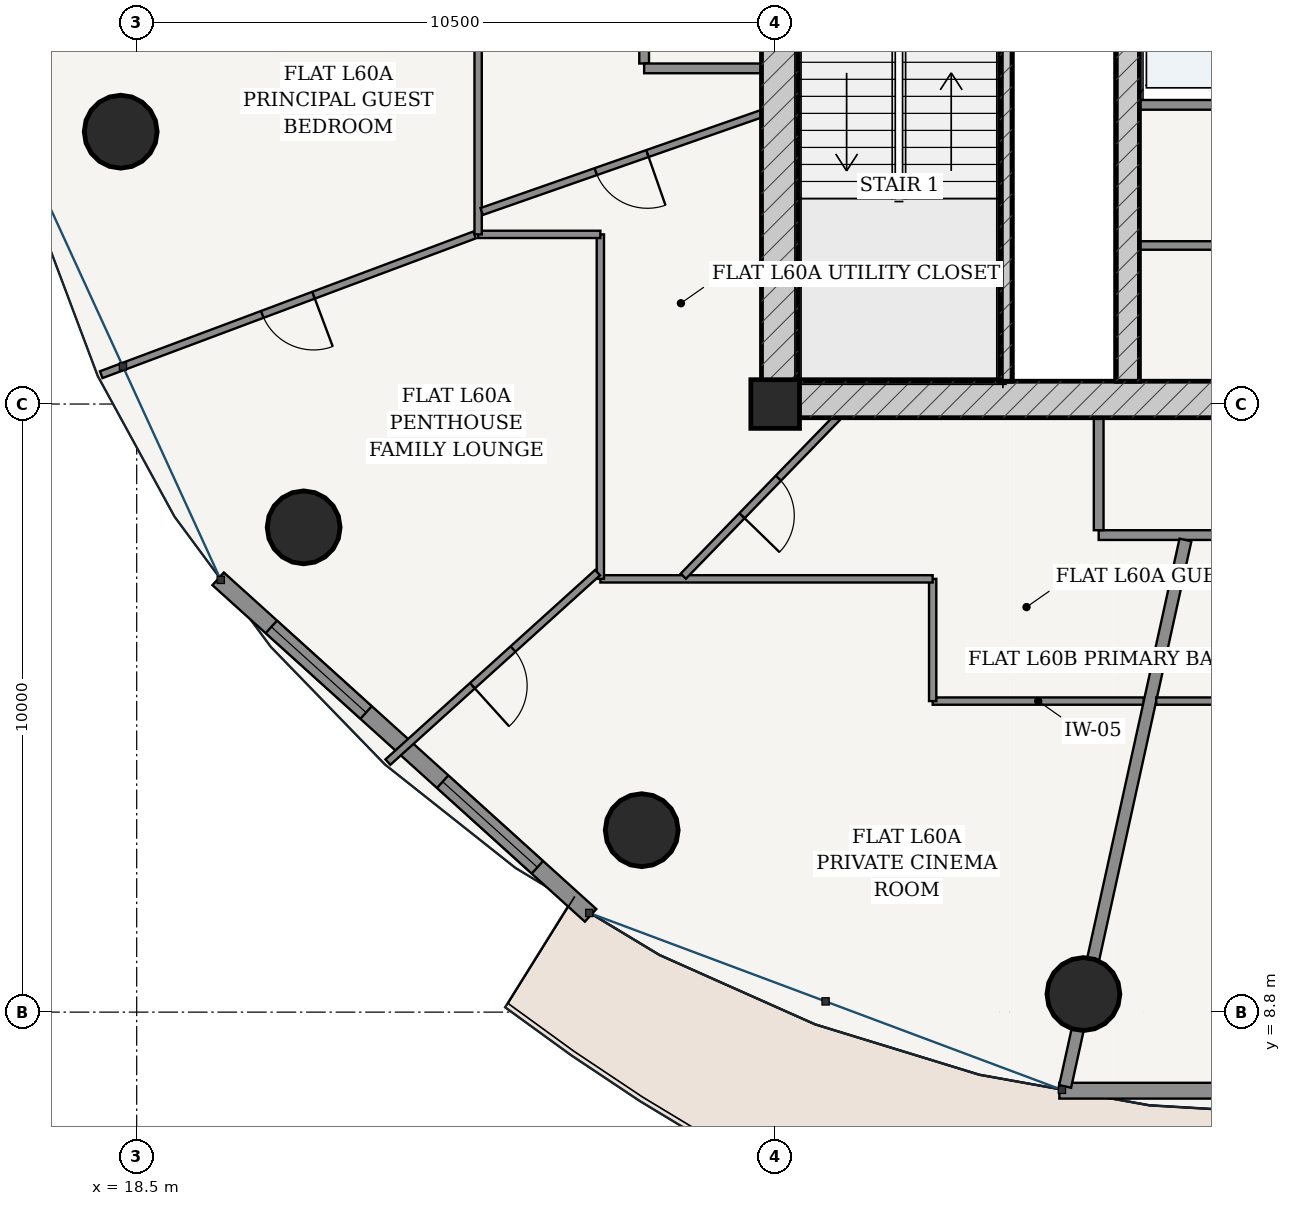
"""IFC4 building model, lengths in metres.
Left out: names, types, materials, properties, quantities, classifications, styles, units other than length and angle.
Written with IfcOpenShell. Run it as: python <this file> out.ifc"""

import sys

from ifc_helpers import new_model, si_unit, direction, frame, frame_2d, origin, origin_2d, place, context, subcontext, project, spatial, rectangle, hollow_circle, extrude, source, transform, mapped, element, fill, save


model = new_model("IFC4")
c1 = context("Model", 3, precision=1e-05, world=origin(), true_north=direction((-0.2419218956, 0.970295726276)))
c2 = subcontext(c1, "Body", "Model", "MODEL_VIEW")
j1 = project(units=[si_unit("LENGTHUNIT", "METRE"), si_unit("PLANEANGLEUNIT", "RADIAN")], contexts=[c1])
p1 = place(None, origin())
s1 = spatial("IfcSite", under=j1, at=p1, CompositionType="ELEMENT")
p2 = place(p1, origin())
s2 = spatial("IfcBuilding", under=s1, at=p2, CompositionType="ELEMENT")
p3 = place(p2, frame((0.0, 0.0, 228.2)))
s3 = spatial("IfcBuildingStorey", under=s2, at=p3, CompositionType="ELEMENT", Elevation=228.2)
p4 = place(p3, frame((29.0, 18.8, 0.0), z_axis=(0.0, 0.0, 1.0), x_axis=(1.0, 0.0, 0.0)))
e1 = element("IfcColumn", 1, at=p4, inside=s3, PredefinedType="COLUMN", context=c2, shape_type="SweptSolid", body=[
    extrude(rectangle(XDim=0.8, YDim=0.8, at=origin_2d()), origin(), (0.0, 0.0, 1.0), 3.7),
])
p5 = place(p3, frame((28.775, 18.875, 0.0), z_axis=(0.0, 0.0, 1.0), x_axis=(1.0, 0.0, 0.0)))
e2 = element("IfcWall", 2, at=p5, inside=s3, PredefinedType="SHEAR", context=c2, shape_type="SweptSolid", body=[
    extrude(rectangle(XDim=18.45, YDim=0.6, at=frame_2d((9.225, 0.0))), origin(), (0.0, 0.0, 1.0), 3.435),
])
p6 = place(p5, frame((8.8, 0.0, 0.0)))
e3 = element("IfcOpeningElement", 3, at=p6, cuts=e2, PredefinedType="OPENING", context=c2, shape_type="SweptSolid", body=[
    extrude(rectangle(XDim=0.85, YDim=2.1, at=frame_2d((0.425, 1.05))), frame((0.0, 0.31, 0.0), z_axis=(0.0, -1.0, 0.0), x_axis=(1.0, 0.0, 0.0)), (0.0, 0.0, 1.0), 0.62),
])
p7 = place(p3, frame((29.075, 19.175, 0.0), z_axis=(0.0, 0.0, 1.0), x_axis=(0.0, 1.0, 0.0)))
e4 = element("IfcWall", 4, at=p7, inside=s3, PredefinedType="SHEAR", context=c2, shape_type="SweptSolid", body=[
    extrude(rectangle(XDim=15.25, YDim=0.6, at=frame_2d((7.625, 0.0))), origin(), (0.0, 0.0, 1.0), 3.435),
])
p8 = place(p7, frame((9.875, 0.0, 0.0)))
e5 = element("IfcOpeningElement", 5, at=p8, cuts=e4, PredefinedType="OPENING", context=c2, shape_type="SweptSolid", body=[
    extrude(rectangle(XDim=1.5, YDim=2.2, at=frame_2d((0.75, 1.1))), frame((0.0, 0.31, 0.0), z_axis=(0.0, -1.0, 0.0), x_axis=(1.0, 0.0, 0.0)), (0.0, 0.0, 1.0), 0.62),
])
p9 = place(p3, frame((32.795, 19.175, 0.0), z_axis=(0.0, 0.0, 1.0), x_axis=(0.0, 1.0, 0.0)))
e6 = element("IfcWall", 6, at=p9, inside=s3, PredefinedType="SOLIDWALL", context=c2, shape_type="SweptSolid", body=[
    extrude(rectangle(XDim=7.375, YDim=0.2, at=frame_2d((3.688, 0.0))), origin(), (0.0, 0.0, 1.0), 3.435),
])
p10 = place(p3, frame((34.8, 19.175, 0.0), z_axis=(0.0, 0.0, 1.0), x_axis=(0.0, 1.0, 0.0)))
e7 = element("IfcWall", 7, at=p10, inside=s3, PredefinedType="SHEAR", context=c2, shape_type="SweptSolid", body=[
    extrude(rectangle(XDim=15.25, YDim=0.38, at=frame_2d((7.625, 0.0))), origin(), (0.0, 0.0, 1.0), 3.435),
])
p11 = place(p10, frame((7.8, 0.0, 0.0)))
e8 = element("IfcOpeningElement", 8, at=p11, cuts=e7, PredefinedType="OPENING", context=c2, shape_type="SweptSolid", body=[
    extrude(rectangle(XDim=1.05, YDim=2.15, at=frame_2d((0.525, 1.075))), frame((0.0, 0.2, 0.0), z_axis=(0.0, -1.0, 0.0), x_axis=(1.0, 0.0, 0.0)), (0.0, 0.0, 1.0), 0.4),
])
for number, where, z_axis, x_axis in (
    (9, (18.237, 23.279, 0.0), (0.0, 0.0, 1.0), (1.0, 0.0, 0.0)),
    (10, (21.246, 16.772, 0.0), (0.0, 0.0, 1.0), (1.0, 0.0, 0.0)),
    (11, (26.805, 11.792, 0.0), (0.0, 0.0, 1.0), (1.0, 0.0, 0.0)),
    (12, (34.069, 9.097, 0.0), (0.0, 0.0, 1.0), (1.0, 0.0, 0.0)),
):
    element("IfcColumn", number, at=place(p3, frame(where, z_axis=z_axis, x_axis=x_axis)), inside=s3, PredefinedType="COLUMN", context=c2, shape_type="SweptSolid", body=[
        extrude(hollow_circle(Radius=0.6, WallThickness=0.038, at=origin_2d()), origin(), (0.0, 0.0, 1.0), 3.7),
    ])
p12 = place(p3, frame((19.84, 15.926, 0.0), z_axis=(0.0, 0.0, 1.0), x_axis=(0.741986838603, -0.670414447443, 0.0)))
e13 = element("IfcWall", 13, at=p12, inside=s3, PredefinedType="SOLIDWALL", context=c2, shape_type="SweptSolid", body=[
    extrude(rectangle(XDim=8.255, YDim=0.28, at=frame_2d((4.127, 0.0))), origin(), (0.0, 0.0, 1.0), 3.435),
])
p13 = place(p12, frame((1.179, 0.0, 0.85)))
e14 = element("IfcOpeningElement", 14, at=p13, cuts=e13, PredefinedType="OPENING", context=c2, shape_type="SweptSolid", body=[
    extrude(rectangle(XDim=2.1, YDim=1.95, at=frame_2d((1.05, 0.975))), frame((0.0, 0.15, 0.0), z_axis=(0.0, -1.0, 0.0), x_axis=(1.0, 0.0, 0.0)), (0.0, 0.0, 1.0), 0.3),
])
p14 = place(p12, frame((4.976, 0.0, 0.85)))
e15 = element("IfcOpeningElement", 15, at=p14, cuts=e13, PredefinedType="OPENING", context=c2, shape_type="SweptSolid", body=[
    extrude(rectangle(XDim=2.1, YDim=1.95, at=frame_2d((1.05, 0.975))), frame((0.0, 0.15, 0.0), z_axis=(0.0, -1.0, 0.0), x_axis=(1.0, 0.0, 0.0)), (0.0, 0.0, 1.0), 0.3),
])
p15 = place(p3, frame((33.673, 7.508, 0.0), z_axis=(0.0, 0.0, 1.0), x_axis=(1.0, 0.0, 0.0)))
e16 = element("IfcWall", 16, at=p15, inside=s3, PredefinedType="SOLIDWALL", context=c2, shape_type="SweptSolid", body=[
    extrude(rectangle(XDim=8.654, YDim=0.26, at=frame_2d((4.327, 0.0))), origin(), (0.0, 0.0, 1.0), 3.435),
])
p16 = place(p15, frame((3.652, 0.0, 0.0)))
e17 = element("IfcOpeningElement", 17, at=p16, cuts=e16, PredefinedType="OPENING", context=c2, shape_type="SweptSolid", body=[
    extrude(rectangle(XDim=1.35, YDim=2.2, at=frame_2d((0.675, 1.1))), frame((0.0, 0.14, 0.0), z_axis=(0.0, -1.0, 0.0), x_axis=(1.0, 0.0, 0.0)), (0.0, 0.0, 1.0), 0.28),
])
p17 = place(p3, frame((34.99, 23.72, 0.0), z_axis=(0.0, 0.0, 1.0), x_axis=(1.0, 0.0, 0.0)))
e18 = element("IfcWall", 18, at=p17, inside=s3, PredefinedType="PARTITIONING", context=c2, shape_type="SweptSolid", body=[
    extrude(rectangle(XDim=6.02, YDim=0.16, at=frame_2d((3.01, 0.0))), origin(), (0.0, 0.0, 1.0), 3.435),
])
p18 = place(p3, frame((34.99, 21.407, 0.0), z_axis=(0.0, 0.0, 1.0), x_axis=(1.0, 0.0, 0.0)))
e19 = element("IfcWall", 19, at=p18, inside=s3, PredefinedType="PARTITIONING", context=c2, shape_type="SweptSolid", body=[
    extrude(rectangle(XDim=6.02, YDim=0.14, at=frame_2d((3.01, 0.0))), origin(), (0.0, 0.0, 1.0), 3.435),
])
p19 = place(p18, frame((2.585, 0.0, 0.0)))
e20 = element("IfcOpeningElement", 20, at=p19, cuts=e19, PredefinedType="OPENING", context=c2, shape_type="SweptSolid", body=[
    extrude(rectangle(XDim=0.85, YDim=2.1, at=frame_2d((0.425, 1.05))), frame((0.0, 0.08, 0.0), z_axis=(0.0, -1.0, 0.0), x_axis=(1.0, 0.0, 0.0)), (0.0, 0.0, 1.0), 0.16),
])
p20 = place(p3, frame((26.845, 24.4, 0.0), z_axis=(0.0, 0.0, 1.0), x_axis=(0.0, 1.0, 0.0)))
e21 = element("IfcWall", 21, at=p20, inside=s3, PredefinedType="PARTITIONING", context=c2, shape_type="SweptSolid", body=[
    extrude(rectangle(XDim=10.625, YDim=0.16, at=frame_2d((5.312, 0.0))), origin(), (0.0, 0.0, 1.0), 2.951),
])
p21 = place(p3, frame((26.845, 24.32, 0.0), z_axis=(0.0, 0.0, 1.0), x_axis=(1.0, 0.0, 0.0)))
e22 = element("IfcWall", 22, at=p21, inside=s3, PredefinedType="PARTITIONING", context=c2, shape_type="SweptSolid", body=[
    extrude(rectangle(XDim=1.93, YDim=0.16, at=frame_2d((0.965, 0.0))), origin(), (0.0, 0.0, 1.0), 3.435),
])
p22 = place(p3, frame((34.32, 16.645, 0.0), z_axis=(0.0, 0.0, 1.0), x_axis=(1.0, 0.0, 0.0)))
e23 = element("IfcWall", 23, at=p22, inside=s3, PredefinedType="PARTITIONING", context=c2, shape_type="SweptSolid", body=[
    extrude(rectangle(XDim=14.835, YDim=0.16, at=frame_2d((7.417, 0.0))), origin(), (0.0, 0.0, 1.0), 2.951),
])
p23 = place(p22, frame((10.135, 0.0, 0.0)))
e24 = element("IfcOpeningElement", 24, at=p23, cuts=e23, PredefinedType="OPENING", context=c2, shape_type="SweptSolid", body=[
    extrude(rectangle(XDim=0.98, YDim=2.2, at=frame_2d((0.49, 1.1))), frame((0.0, 0.09, 0.0), z_axis=(0.0, -1.0, 0.0), x_axis=(1.0, 0.0, 0.0)), (0.0, 0.0, 1.0), 0.18),
])
p24 = place(p3, frame((34.32, 16.725, 0.0), z_axis=(0.0, 0.0, 1.0), x_axis=(0.0, 1.0, 0.0)))
e25 = element("IfcWall", 25, at=p24, inside=s3, PredefinedType="PARTITIONING", context=c2, shape_type="SweptSolid", body=[
    extrude(rectangle(XDim=1.85, YDim=0.16, at=frame_2d((0.925, 0.0))), origin(), (0.0, 0.0, 1.0), 3.435),
])
p25 = place(p3, frame((35.062, 13.915, 0.0), z_axis=(0.0, 0.0, 1.0), x_axis=(-1.0, 0.0, 0.0)))
e26 = element("IfcWall", 26, at=p25, inside=s3, PredefinedType="PARTITIONING", context=c2, shape_type="SweptSolid", body=[
    extrude(rectangle(XDim=3.472, YDim=0.12, at=frame_2d((1.736, 0.0))), origin(), (0.0, 0.0, 1.0), 2.951),
])
p26 = place(p3, frame((31.59, 13.915, 0.0), z_axis=(0.0, 0.0, 1.0), x_axis=(0.0, 1.0, 0.0)))
e27 = element("IfcWall", 27, at=p26, inside=s3, PredefinedType="PARTITIONING", context=c2, shape_type="SweptSolid", body=[
    extrude(rectangle(XDim=2.01, YDim=0.12, at=frame_2d((1.005, 0.0))), origin(), (0.0, 0.0, 1.0), 3.11),
])
p27 = place(p3, frame((31.59, 15.925, 0.0), z_axis=(0.0, 0.0, 1.0), x_axis=(-1.0, 0.0, 0.0)))
e28 = element("IfcWall", 28, at=p27, inside=s3, PredefinedType="PARTITIONING", context=c2, shape_type="SweptSolid", body=[
    extrude(rectangle(XDim=5.465, YDim=0.12, at=frame_2d((2.732, 0.0))), origin(), (0.0, 0.0, 1.0), 2.951),
])
p28 = place(p3, frame((26.125, 15.925, 0.0), z_axis=(0.0, 0.0, 1.0), x_axis=(0.0, 1.0, 0.0)))
e29 = element("IfcWall", 29, at=p28, inside=s3, PredefinedType="PARTITIONING", context=c2, shape_type="SweptSolid", body=[
    extrude(rectangle(XDim=5.665, YDim=0.12, at=frame_2d((2.833, 0.0))), origin(), (0.0, 0.0, 1.0), 2.951),
])
p29 = place(p3, frame((26.125, 21.59, 0.0), z_axis=(0.0, 0.0, 1.0), x_axis=(-1.0, 0.0, 0.0)))
e30 = element("IfcWall", 30, at=p29, inside=s3, PredefinedType="PARTITIONING", context=c2, shape_type="SweptSolid", body=[
    extrude(rectangle(XDim=2.01, YDim=0.12, at=frame_2d((1.005, 0.0))), origin(), (0.0, 0.0, 1.0), 3.11),
])
p30 = place(p3, frame((24.115, 21.59, 0.0), z_axis=(0.0, 0.0, 1.0), x_axis=(0.0, 1.0, 0.0)))
e31 = element("IfcWall", 31, at=p30, inside=s3, PredefinedType="PARTITIONING", context=c2, shape_type="SweptSolid", body=[
    extrude(rectangle(XDim=16.245, YDim=0.12, at=frame_2d((8.123, 0.0))), origin(), (0.0, 0.0, 1.0), 2.951),
])
p31 = place(p30, frame((10.733, 0.0, 0.0)))
e32 = element("IfcOpeningElement", 32, at=p31, cuts=e31, PredefinedType="OPENING", context=c2, shape_type="SweptSolid", body=[
    extrude(rectangle(XDim=0.9, YDim=2.15, at=frame_2d((0.45, 1.075))), frame((0.0, 0.07, 0.0), z_axis=(0.0, -1.0, 0.0), x_axis=(1.0, 0.0, 0.0)), (0.0, 0.0, 1.0), 0.14),
])
p32 = place(p3, frame((24.057, 21.581, 0.0), z_axis=(0.0, 0.0, 1.0), x_axis=(-0.936527968377, -0.350592875637, 0.0)))
e33 = element("IfcWall", 33, at=p32, inside=s3, PredefinedType="PARTITIONING", context=c2, shape_type="SweptSolid", body=[
    extrude(rectangle(XDim=6.556, YDim=0.12, at=frame_2d((3.278, 0.0))), origin(), (0.0, 0.0, 1.0), 2.951),
])
p33 = place(p32, frame((2.828, 0.0, 0.0)))
e34 = element("IfcOpeningElement", 34, at=p33, cuts=e33, PredefinedType="OPENING", context=c2, shape_type="SweptSolid", body=[
    extrude(rectangle(XDim=0.9, YDim=2.15, at=frame_2d((0.45, 1.075))), frame((0.0, 0.07, 0.0), z_axis=(0.0, -1.0, 0.0), x_axis=(1.0, 0.0, 0.0)), (0.0, 0.0, 1.0), 0.14),
])
p34 = place(p3, frame((26.079, 16.027, 0.0), z_axis=(0.0, 0.0, 1.0), x_axis=(-0.741950057395, -0.67045515311, 0.0)))
e35 = element("IfcWall", 35, at=p34, inside=s3, PredefinedType="PARTITIONING", context=c2, shape_type="SweptSolid", body=[
    extrude(rectangle(XDim=4.647, YDim=0.12, at=frame_2d((2.324, 0.0))), origin(), (0.0, 0.0, 1.0), 2.951),
])
p35 = place(p34, frame((1.874, 0.0, 0.0)))
e36 = element("IfcOpeningElement", 36, at=p35, cuts=e35, PredefinedType="OPENING", context=c2, shape_type="SweptSolid", body=[
    extrude(rectangle(XDim=0.9, YDim=2.15, at=frame_2d((0.45, 1.075))), frame((0.0, 0.07, 0.0), z_axis=(0.0, -1.0, 0.0), x_axis=(1.0, 0.0, 0.0)), (0.0, 0.0, 1.0), 0.14),
])
p36 = place(p3, frame((28.775, 23.575, 0.0), z_axis=(0.0, 0.0, 1.0), x_axis=(-0.943974645063, -0.330017983569, 0.0)))
e37 = element("IfcWall", 37, at=p36, inside=s3, PredefinedType="PARTITIONING", context=c2, shape_type="SweptSolid", body=[
    extrude(rectangle(XDim=4.875, YDim=0.12, at=frame_2d((2.437, 0.0))), origin(), (0.0, 0.0, 1.0), 3.11),
])
p37 = place(p36, frame((1.987, 0.0, 0.0)))
e38 = element("IfcOpeningElement", 38, at=p37, cuts=e37, PredefinedType="OPENING", context=c2, shape_type="SweptSolid", body=[
    extrude(rectangle(XDim=0.9, YDim=2.15, at=frame_2d((0.45, 1.075))), frame((0.0, 0.07, 0.0), z_axis=(0.0, -1.0, 0.0), x_axis=(1.0, 0.0, 0.0)), (0.0, 0.0, 1.0), 0.14),
])
p38 = place(p3, frame((30.018, 18.575, 0.0), z_axis=(0.0, 0.0, 1.0), x_axis=(-0.696436677683, -0.717618250867, 0.0)))
e39 = element("IfcWall", 39, at=p38, inside=s3, PredefinedType="PARTITIONING", context=c2, shape_type="SweptSolid", body=[
    extrude(rectangle(XDim=3.631, YDim=0.12, at=frame_2d((1.815, 0.0))), origin(), (0.0, 0.0, 1.0), 2.951),
])
p39 = place(p38, frame((1.385, 0.0, 0.0)))
e40 = element("IfcOpeningElement", 40, at=p39, cuts=e39, PredefinedType="OPENING", context=c2, shape_type="SweptSolid", body=[
    extrude(rectangle(XDim=0.86, YDim=2.15, at=frame_2d((0.43, 1.075))), frame((0.0, 0.07, 0.0), z_axis=(0.0, -1.0, 0.0), x_axis=(1.0, 0.0, 0.0)), (0.0, 0.0, 1.0), 0.14),
])
p40 = place(p3, frame((35.747, 16.565, 0.0), z_axis=(0.0, 0.0, 1.0), x_axis=(-0.214957946814, -0.976623305631, 0.0)))
e41 = element("IfcWall", 41, at=p40, inside=s3, PredefinedType="PARTITIONING", context=c2, shape_type="SweptSolid", body=[
    extrude(rectangle(XDim=9.202, YDim=0.2, at=frame_2d((4.601, 0.0))), origin(), (0.0, 0.0, 1.0), 2.951),
])
p41 = place(p3, frame((51.885, 13.915, 0.0), z_axis=(0.0, 0.0, 1.0), x_axis=(-1.0, 0.0, 0.0)))
e42 = element("IfcWall", 42, at=p41, inside=s3, PredefinedType="PARTITIONING", context=c2, shape_type="SweptSolid", body=[
    extrude(rectangle(XDim=16.619, YDim=0.12, at=frame_2d((8.31, 0.0))), origin(), (0.0, 0.0, 1.0), 2.951),
])
p42 = place(p41, frame((6.797, 0.0, 0.0)))
e43 = element("IfcOpeningElement", 43, at=p42, cuts=e42, PredefinedType="OPENING", context=c2, shape_type="SweptSolid", body=[
    extrude(rectangle(XDim=0.9, YDim=2.15, at=frame_2d((0.45, 1.075))), frame((0.0, 0.07, 0.0), z_axis=(0.0, -1.0, 0.0), x_axis=(1.0, 0.0, 0.0)), (0.0, 0.0, 1.0), 0.14),
])
p43 = place(p41, frame((1.849, 0.0, 0.0)))
e44 = element("IfcOpeningElement", 44, at=p43, cuts=e42, PredefinedType="OPENING", context=c2, shape_type="SweptSolid", body=[
    extrude(rectangle(XDim=0.9, YDim=2.15, at=frame_2d((0.45, 1.075))), frame((0.0, 0.07, 0.0), z_axis=(0.0, -1.0, 0.0), x_axis=(1.0, 0.0, 0.0)), (0.0, 0.0, 1.0), 0.14),
])
m1 = source(origin(), c2, "Body", "SweptSolid", [
    extrude(rectangle(XDim=2.1, YDim=1.95, at=frame_2d((1.05, 0.975))), frame((0.0, 0.03, 0.0), z_axis=(0.0, -1.0, 0.0), x_axis=(1.0, 0.0, 0.0)), (0.0, 0.0, 1.0), 0.06),
])
p44 = place(p13, origin())
e45 = element("IfcWindow", 45, at=p44, inside=s3, PartitioningType="SINGLE_PANEL", PredefinedType="WINDOW", context=c2, shape_type="MappedRepresentation", body=[
    mapped(m1, transform((0.0, 0.0, 0.0), scale=1.0)),
])
fill(e14, e45)
p45 = place(p14, origin())
e46 = element("IfcWindow", 46, at=p45, inside=s3, PartitioningType="SINGLE_PANEL", PredefinedType="WINDOW", context=c2, shape_type="MappedRepresentation", body=[
    mapped(m1, transform((0.0, 0.0, 0.0), scale=1.0)),
])
fill(e15, e46)
m2 = source(origin(), c2, "Body", "SweptSolid", [
    extrude(rectangle(XDim=0.9, YDim=2.15, at=frame_2d((0.45, 1.075))), frame((0.0, 0.025, 0.0), z_axis=(0.0, -1.0, 0.0), x_axis=(1.0, 0.0, 0.0)), (0.0, 0.0, 1.0), 0.05),
])
p46 = place(p37, origin())
e47 = element("IfcDoor", 47, at=p46, inside=s3, OperationType="SINGLE_SWING_LEFT", PredefinedType="DOOR", context=c2, shape_type="MappedRepresentation", body=[
    mapped(m2, transform((0.0, 0.0, 0.0), scale=1.0)),
])
fill(e38, e47)
m3 = source(origin(), c2, "Body", "SweptSolid", [
    extrude(rectangle(XDim=0.86, YDim=2.15, at=frame_2d((0.43, 1.075))), frame((0.0, 0.025, 0.0), z_axis=(0.0, -1.0, 0.0), x_axis=(1.0, 0.0, 0.0)), (0.0, 0.0, 1.0), 0.05),
])
p47 = place(p39, origin())
e48 = element("IfcDoor", 48, at=p47, inside=s3, OperationType="SINGLE_SWING_RIGHT", PredefinedType="DOOR", context=c2, shape_type="MappedRepresentation", body=[
    mapped(m3, transform((0.0, 0.0, 0.0), scale=1.0)),
])
fill(e40, e48)
p48 = place(p33, origin())
e49 = element("IfcDoor", 49, at=p48, inside=s3, OperationType="SINGLE_SWING_LEFT", PredefinedType="DOOR", context=c2, shape_type="MappedRepresentation", body=[
    mapped(m2, transform((0.0, 0.0, 0.0), scale=1.0)),
])
fill(e34, e49)
p49 = place(p35, origin())
e50 = element("IfcDoor", 50, at=p49, inside=s3, OperationType="SINGLE_SWING_RIGHT", PredefinedType="DOOR", context=c2, shape_type="MappedRepresentation", body=[
    mapped(m2, transform((0.0, 0.0, 0.0), scale=1.0)),
])
fill(e36, e50)
save(model, sys.argv[1])
